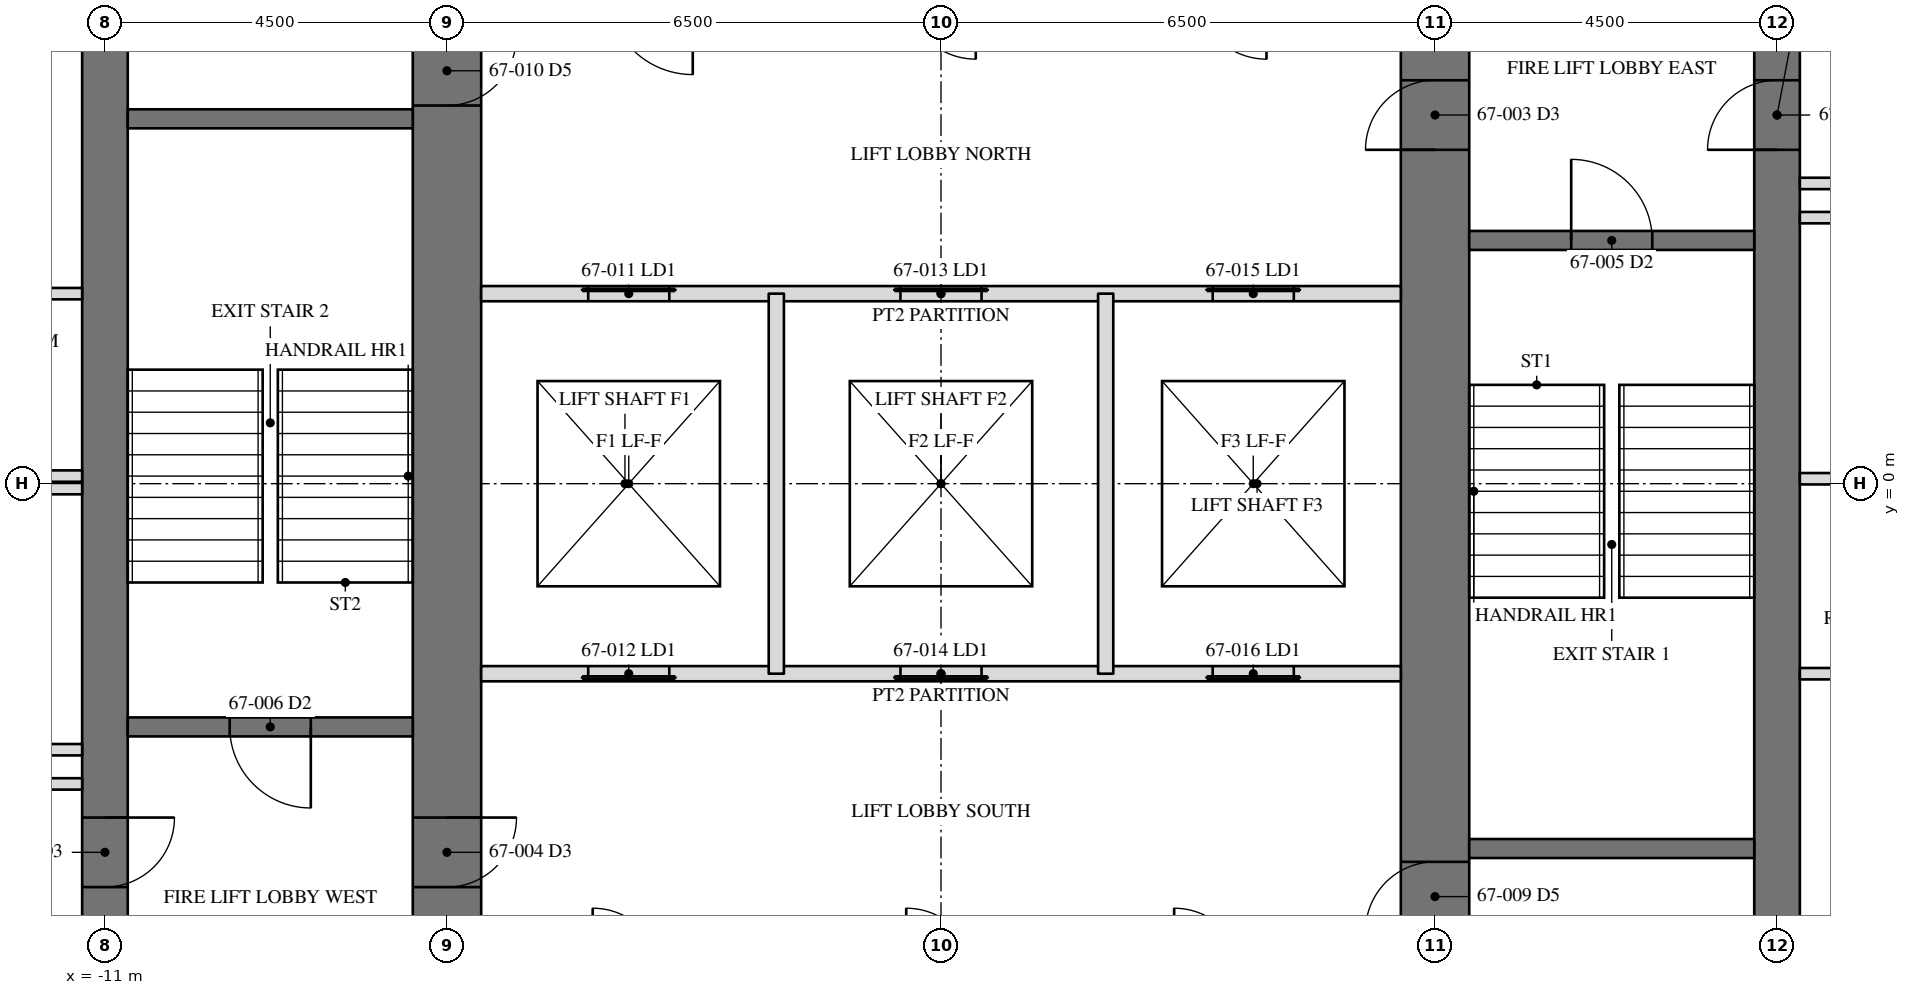
"""IFC4 building model, lengths in metres.
Left out: names, types, materials, properties, quantities, classifications, styles, units other than length and angle.
Written with IfcOpenShell. Run it as: python <this file> out.ifc"""

import sys

from ifc_helpers import new_model, si_unit, direction, frame, frame_2d, origin, place, context, subcontext, project, spatial, rectangle, extrude, element, fill, save


model = new_model("IFC4")
c1 = context("Model", 3, precision=1e-05, world=origin(), true_north=direction((0.0, 1.0)))
c2 = subcontext(c1, "Body", "Model", "MODEL_VIEW")
j1 = project(units=[si_unit("LENGTHUNIT", "METRE"), si_unit("PLANEANGLEUNIT", "RADIAN")], contexts=[c1])
p1 = place(None, origin())
s1 = spatial("IfcSite", under=j1, at=p1, CompositionType="ELEMENT")
p2 = place(p1, origin())
s2 = spatial("IfcBuilding", under=s1, at=p2, CompositionType="ELEMENT")
p3 = place(p2, frame((0.0, 0.0, 274.0)))
s3 = spatial("IfcBuildingStorey", under=s2, at=p3, CompositionType="ELEMENT", Elevation=274.0)
p4 = place(p3, frame((11.0, -11.0, 0.0), z_axis=(0.0, 0.0, 1.0), x_axis=(0.0, 1.0, 0.0)))
e1 = element("IfcWall", 1, at=p4, inside=s3, PredefinedType="SHEAR", context=c2, shape_type="SweptSolid", body=[
    extrude(rectangle(XDim=22.0, YDim=0.6, at=frame_2d((11.0, 0.0))), origin(), (0.0, 0.0, 1.0), 3.6),
])
p5 = place(p4, frame((15.393, 0.0, 0.0)))
e2 = element("IfcOpeningElement", 2, at=p5, cuts=e1, PredefinedType="OPENING", context=c2, shape_type="SweptSolid", body=[
    extrude(rectangle(XDim=0.915, YDim=2.134, at=frame_2d((0.458, 1.067))), frame((0.0, 0.31, 0.0), z_axis=(0.0, -1.0, 0.0), x_axis=(1.0, 0.0, 0.0)), (0.0, 0.0, 1.0), 0.62),
])
p6 = place(p3, frame((-11.0, 11.0, 0.0), z_axis=(0.0, 0.0, 1.0), x_axis=(0.0, -1.0, 0.0)))
e3 = element("IfcWall", 3, at=p6, inside=s3, PredefinedType="SHEAR", context=c2, shape_type="SweptSolid", body=[
    extrude(rectangle(XDim=22.0, YDim=0.6, at=frame_2d((11.0, 0.0))), origin(), (0.0, 0.0, 1.0), 3.6),
])
p7 = place(p6, frame((15.393, 0.0, 0.0)))
e4 = element("IfcOpeningElement", 4, at=p7, cuts=e3, PredefinedType="OPENING", context=c2, shape_type="SweptSolid", body=[
    extrude(rectangle(XDim=0.915, YDim=2.134, at=frame_2d((0.458, 1.067))), frame((0.0, 0.31, 0.0), z_axis=(0.0, -1.0, 0.0), x_axis=(1.0, 0.0, 0.0)), (0.0, 0.0, 1.0), 0.62),
])
p8 = place(p3, frame((6.5, -6.5, 0.0), z_axis=(0.0, 0.0, 1.0), x_axis=(0.0, 1.0, 0.0)))
e5 = element("IfcWall", 5, at=p8, inside=s3, PredefinedType="SHEAR", context=c2, shape_type="SweptSolid", body=[
    extrude(rectangle(XDim=13.0, YDim=0.9, at=frame_2d((6.5, 0.0))), origin(), (0.0, 0.0, 1.0), 3.6),
])
p9 = place(p8, frame((10.893, 0.0, 0.0)))
e6 = element("IfcOpeningElement", 6, at=p9, cuts=e5, PredefinedType="OPENING", context=c2, shape_type="SweptSolid", body=[
    extrude(rectangle(XDim=0.915, YDim=2.134, at=frame_2d((0.458, 1.067))), frame((0.0, 0.46, 0.0), z_axis=(0.0, -1.0, 0.0), x_axis=(1.0, 0.0, 0.0)), (0.0, 0.0, 1.0), 0.92),
])
p10 = place(p8, frame((0.61, 0.0, 0.0)))
e7 = element("IfcOpeningElement", 7, at=p10, cuts=e5, PredefinedType="OPENING", context=c2, shape_type="SweptSolid", body=[
    extrude(rectangle(XDim=0.915, YDim=2.134, at=frame_2d((0.458, 1.067))), frame((0.0, 0.46, 0.0), z_axis=(0.0, -1.0, 0.0), x_axis=(1.0, 0.0, 0.0)), (0.0, 0.0, 1.0), 0.92),
])
p11 = place(p3, frame((-6.5, 6.5, 0.0), z_axis=(0.0, 0.0, 1.0), x_axis=(0.0, -1.0, 0.0)))
e8 = element("IfcWall", 8, at=p11, inside=s3, PredefinedType="SHEAR", context=c2, shape_type="SweptSolid", body=[
    extrude(rectangle(XDim=13.0, YDim=0.9, at=frame_2d((6.5, 0.0))), origin(), (0.0, 0.0, 1.0), 3.6),
])
p12 = place(p11, frame((10.893, 0.0, 0.0)))
e9 = element("IfcOpeningElement", 9, at=p12, cuts=e8, PredefinedType="OPENING", context=c2, shape_type="SweptSolid", body=[
    extrude(rectangle(XDim=0.915, YDim=2.134, at=frame_2d((0.458, 1.067))), frame((0.0, 0.46, 0.0), z_axis=(0.0, -1.0, 0.0), x_axis=(1.0, 0.0, 0.0)), (0.0, 0.0, 1.0), 0.92),
])
p13 = place(p11, frame((0.61, 0.0, 0.0)))
e10 = element("IfcOpeningElement", 10, at=p13, cuts=e8, PredefinedType="OPENING", context=c2, shape_type="SweptSolid", body=[
    extrude(rectangle(XDim=0.915, YDim=2.134, at=frame_2d((0.458, 1.067))), frame((0.0, 0.46, 0.0), z_axis=(0.0, -1.0, 0.0), x_axis=(1.0, 0.0, 0.0)), (0.0, 0.0, 1.0), 0.92),
])
for number, where, z_axis, x_axis in (
    (11, (6.95, -4.8, 0.0), (0.0, 0.0, 1.0), (1.0, 0.0, 0.0)),
    (12, (-6.95, 4.8, 0.0), (0.0, 0.0, 1.0), (-1.0, 0.0, 0.0)),
):
    element("IfcWall", number, at=place(p3, frame(where, z_axis=z_axis, x_axis=x_axis)), inside=s3, PredefinedType="SOLIDWALL", context=c2, shape_type="SweptSolid", body=[
        extrude(rectangle(XDim=3.75, YDim=0.25, at=frame_2d((1.875, 0.0))), origin(), (0.0, 0.0, 1.0), 3.41),
    ])
p14 = place(p3, frame((6.95, 3.2, 0.0), z_axis=(0.0, 0.0, 1.0), x_axis=(1.0, 0.0, 0.0)))
e13 = element("IfcWall", 13, at=p14, inside=s3, PredefinedType="SOLIDWALL", context=c2, shape_type="SweptSolid", body=[
    extrude(rectangle(XDim=3.75, YDim=0.25, at=frame_2d((1.875, 0.0))), origin(), (0.0, 0.0, 1.0), 3.41),
])
p15 = place(p14, frame((1.342, 0.0, 0.0)))
e14 = element("IfcOpeningElement", 14, at=p15, cuts=e13, PredefinedType="OPENING", context=c2, shape_type="SweptSolid", body=[
    extrude(rectangle(XDim=1.067, YDim=2.134, at=frame_2d((0.533, 1.067))), frame((0.0, 0.135, 0.0), z_axis=(0.0, -1.0, 0.0), x_axis=(1.0, 0.0, 0.0)), (0.0, 0.0, 1.0), 0.27),
])
p16 = place(p3, frame((-6.95, -3.2, 0.0), z_axis=(0.0, 0.0, 1.0), x_axis=(-1.0, 0.0, 0.0)))
e15 = element("IfcWall", 15, at=p16, inside=s3, PredefinedType="SOLIDWALL", context=c2, shape_type="SweptSolid", body=[
    extrude(rectangle(XDim=3.75, YDim=0.25, at=frame_2d((1.875, 0.0))), origin(), (0.0, 0.0, 1.0), 3.41),
])
p17 = place(p16, frame((1.342, 0.0, 0.0)))
e16 = element("IfcOpeningElement", 16, at=p17, cuts=e15, PredefinedType="OPENING", context=c2, shape_type="SweptSolid", body=[
    extrude(rectangle(XDim=1.067, YDim=2.134, at=frame_2d((0.533, 1.067))), frame((0.0, 0.135, 0.0), z_axis=(0.0, -1.0, 0.0), x_axis=(1.0, 0.0, 0.0)), (0.0, 0.0, 1.0), 0.27),
])
p18 = place(p3, frame((-6.05, 2.5, 0.0), z_axis=(0.0, 0.0, 1.0), x_axis=(1.0, 0.0, 0.0)))
e17 = element("IfcWall", 17, at=p18, inside=s3, PredefinedType="PARTITIONING", context=c2, shape_type="SweptSolid", body=[
    extrude(rectangle(XDim=12.1, YDim=0.2, at=frame_2d((6.05, 0.0))), origin(), (0.0, 0.0, 1.0), 3.41),
])
p19 = place(p18, frame((1.408, 0.0, 0.0)))
e18 = element("IfcOpeningElement", 18, at=p19, cuts=e17, PredefinedType="OPENING", context=c2, shape_type="SweptSolid", body=[
    extrude(rectangle(XDim=1.067, YDim=2.134, at=frame_2d((0.533, 1.067))), frame((0.0, 0.11, 0.0), z_axis=(0.0, -1.0, 0.0), x_axis=(1.0, 0.0, 0.0)), (0.0, 0.0, 1.0), 0.22),
])
p20 = place(p18, frame((5.517, 0.0, 0.0)))
e19 = element("IfcOpeningElement", 19, at=p20, cuts=e17, PredefinedType="OPENING", context=c2, shape_type="SweptSolid", body=[
    extrude(rectangle(XDim=1.067, YDim=2.134, at=frame_2d((0.533, 1.067))), frame((0.0, 0.11, 0.0), z_axis=(0.0, -1.0, 0.0), x_axis=(1.0, 0.0, 0.0)), (0.0, 0.0, 1.0), 0.22),
])
p21 = place(p18, frame((9.625, 0.0, 0.0)))
e20 = element("IfcOpeningElement", 20, at=p21, cuts=e17, PredefinedType="OPENING", context=c2, shape_type="SweptSolid", body=[
    extrude(rectangle(XDim=1.067, YDim=2.134, at=frame_2d((0.533, 1.067))), frame((0.0, 0.11, 0.0), z_axis=(0.0, -1.0, 0.0), x_axis=(1.0, 0.0, 0.0)), (0.0, 0.0, 1.0), 0.22),
])
p22 = place(p3, frame((6.05, -2.5, 0.0), z_axis=(0.0, 0.0, 1.0), x_axis=(-1.0, 0.0, 0.0)))
e21 = element("IfcWall", 21, at=p22, inside=s3, PredefinedType="PARTITIONING", context=c2, shape_type="SweptSolid", body=[
    extrude(rectangle(XDim=12.1, YDim=0.2, at=frame_2d((6.05, 0.0))), origin(), (0.0, 0.0, 1.0), 3.41),
])
p23 = place(p22, frame((9.625, 0.0, 0.0)))
e22 = element("IfcOpeningElement", 22, at=p23, cuts=e21, PredefinedType="OPENING", context=c2, shape_type="SweptSolid", body=[
    extrude(rectangle(XDim=1.067, YDim=2.134, at=frame_2d((0.533, 1.067))), frame((0.0, 0.11, 0.0), z_axis=(0.0, -1.0, 0.0), x_axis=(1.0, 0.0, 0.0)), (0.0, 0.0, 1.0), 0.22),
])
p24 = place(p22, frame((5.517, 0.0, 0.0)))
e23 = element("IfcOpeningElement", 23, at=p24, cuts=e21, PredefinedType="OPENING", context=c2, shape_type="SweptSolid", body=[
    extrude(rectangle(XDim=1.067, YDim=2.134, at=frame_2d((0.533, 1.067))), frame((0.0, 0.11, 0.0), z_axis=(0.0, -1.0, 0.0), x_axis=(1.0, 0.0, 0.0)), (0.0, 0.0, 1.0), 0.22),
])
p25 = place(p22, frame((1.408, 0.0, 0.0)))
e24 = element("IfcOpeningElement", 24, at=p25, cuts=e21, PredefinedType="OPENING", context=c2, shape_type="SweptSolid", body=[
    extrude(rectangle(XDim=1.067, YDim=2.134, at=frame_2d((0.533, 1.067))), frame((0.0, 0.11, 0.0), z_axis=(0.0, -1.0, 0.0), x_axis=(1.0, 0.0, 0.0)), (0.0, 0.0, 1.0), 0.22),
])
for number, where, z_axis, x_axis in (
    (25, (-2.167, -2.5, 0.0), (0.0, 0.0, 1.0), (0.0, 1.0, 0.0)),
    (26, (2.167, -2.5, 0.0), (0.0, 0.0, 1.0), (0.0, 1.0, 0.0)),
):
    element("IfcWall", number, at=place(p3, frame(where, z_axis=z_axis, x_axis=x_axis)), inside=s3, PredefinedType="PARTITIONING", context=c2, shape_type="SweptSolid", body=[
        extrude(rectangle(XDim=5.0, YDim=0.2, at=frame_2d((2.5, 0.0))), origin(), (0.0, 0.0, 1.0), 3.41),
    ])
p26 = place(p3, frame((11.3, 0.065, 0.0), z_axis=(0.0, 0.0, 1.0), x_axis=(1.0, 0.0, 0.0)))
e27 = element("IfcWall", 27, at=p26, inside=s3, PredefinedType="PARTITIONING", context=c2, shape_type="SweptSolid", body=[
    extrude(rectangle(XDim=5.615, YDim=0.15, at=frame_2d((2.808, 0.0))), origin(), (0.0, 0.0, 1.0), 2.709),
])
p27 = place(p26, frame((3.242, 0.0, 0.0)))
e28 = element("IfcOpeningElement", 28, at=p27, cuts=e27, PredefinedType="OPENING", context=c2, shape_type="SweptSolid", body=[
    extrude(rectangle(XDim=0.915, YDim=2.134, at=frame_2d((0.458, 1.067))), frame((0.0, 0.085, 0.0), z_axis=(0.0, -1.0, 0.0), x_axis=(1.0, 0.0, 0.0)), (0.0, 0.0, 1.0), 0.17),
])
p28 = place(p3, frame((11.3, 3.95, 0.0), z_axis=(0.0, 0.0, 1.0), x_axis=(1.0, 0.0, 0.0)))
e29 = element("IfcWall", 29, at=p28, inside=s3, PredefinedType="PARTITIONING", context=c2, shape_type="SweptSolid", body=[
    extrude(rectangle(XDim=1.525, YDim=0.15, at=frame_2d((0.762, 0.0))), origin(), (0.0, 0.0, 1.0), 3.41),
])
p29 = place(p3, frame((11.3, 3.5, 0.0), z_axis=(0.0, 0.0, 1.0), x_axis=(1.0, 0.0, 0.0)))
e30 = element("IfcWall", 30, at=p29, inside=s3, PredefinedType="PARTITIONING", context=c2, shape_type="SweptSolid", body=[
    extrude(rectangle(XDim=2.725, YDim=0.15, at=frame_2d((1.362, 0.0))), origin(), (0.0, 0.0, 1.0), 3.41),
])
p30 = place(p3, frame((11.3, -2.5, 0.0), z_axis=(0.0, 0.0, 1.0), x_axis=(1.0, 0.0, 0.0)))
e31 = element("IfcWall", 31, at=p30, inside=s3, PredefinedType="PARTITIONING", context=c2, shape_type="SweptSolid", body=[
    extrude(rectangle(XDim=2.375, YDim=0.15, at=frame_2d((1.188, 0.0))), origin(), (0.0, 0.0, 1.0), 3.41),
])
p31 = place(p3, frame((-11.3, -3.95, 0.0), z_axis=(0.0, 0.0, 1.0), x_axis=(-1.0, 0.0, 0.0)))
e32 = element("IfcWall", 32, at=p31, inside=s3, PredefinedType="PARTITIONING", context=c2, shape_type="SweptSolid", body=[
    extrude(rectangle(XDim=1.525, YDim=0.15, at=frame_2d((0.762, 0.0))), origin(), (0.0, 0.0, 1.0), 3.41),
])
p32 = place(p3, frame((-11.3, -0.065, 0.0), z_axis=(0.0, 0.0, 1.0), x_axis=(-1.0, 0.0, 0.0)))
e33 = element("IfcWall", 33, at=p32, inside=s3, PredefinedType="PARTITIONING", context=c2, shape_type="SweptSolid", body=[
    extrude(rectangle(XDim=2.725, YDim=0.15, at=frame_2d((1.362, 0.0))), origin(), (0.0, 0.0, 1.0), 2.709),
])
p33 = place(p3, frame((-11.3, -3.5, 0.0), z_axis=(0.0, 0.0, 1.0), x_axis=(-1.0, 0.0, 0.0)))
e34 = element("IfcWall", 34, at=p33, inside=s3, PredefinedType="PARTITIONING", context=c2, shape_type="SweptSolid", body=[
    extrude(rectangle(XDim=2.725, YDim=0.15, at=frame_2d((1.362, 0.0))), origin(), (0.0, 0.0, 1.0), 3.41),
])
p34 = place(p3, frame((-11.3, 2.5, 0.0), z_axis=(0.0, 0.0, 1.0), x_axis=(-1.0, 0.0, 0.0)))
e35 = element("IfcWall", 35, at=p34, inside=s3, PredefinedType="PARTITIONING", context=c2, shape_type="SweptSolid", body=[
    extrude(rectangle(XDim=2.375, YDim=0.15, at=frame_2d((1.188, 0.0))), origin(), (0.0, 0.0, 1.0), 3.41),
])
p35 = place(p3, frame((-11.3, 0.1, 0.0), z_axis=(0.0, 0.0, 1.0), x_axis=(-1.0, 0.0, 0.0)))
e36 = element("IfcWall", 36, at=p35, inside=s3, PredefinedType="PARTITIONING", context=c2, shape_type="SweptSolid", body=[
    extrude(rectangle(XDim=2.375, YDim=0.15, at=frame_2d((1.188, 0.0))), origin(), (0.0, 0.0, 1.0), 2.709),
])
p36 = place(p5, origin())
e37 = element("IfcDoor", 37, at=p36, inside=s3, OperationType="SINGLE_SWING_RIGHT", PredefinedType="DOOR", context=c2, shape_type="SweptSolid", body=[
    extrude(rectangle(XDim=0.915, YDim=2.134, at=frame_2d((0.458, 1.067))), frame((0.0, -0.225, 0.0), z_axis=(0.0, -1.0, 0.0), x_axis=(1.0, 0.0, 0.0)), (0.0, 0.0, 1.0), 0.05),
])
fill(e2, e37)
p37 = place(p7, origin())
e38 = element("IfcDoor", 38, at=p37, inside=s3, OperationType="SINGLE_SWING_RIGHT", PredefinedType="DOOR", context=c2, shape_type="SweptSolid", body=[
    extrude(rectangle(XDim=0.915, YDim=2.134, at=frame_2d((0.458, 1.067))), frame((0.0, -0.225, 0.0), z_axis=(0.0, -1.0, 0.0), x_axis=(1.0, 0.0, 0.0)), (0.0, 0.0, 1.0), 0.05),
])
fill(e4, e38)
p38 = place(p9, origin())
e39 = element("IfcDoor", 39, at=p38, inside=s3, OperationType="SINGLE_SWING_RIGHT", PredefinedType="DOOR", context=c2, shape_type="SweptSolid", body=[
    extrude(rectangle(XDim=0.915, YDim=2.134, at=frame_2d((0.458, 1.067))), frame((0.0, -0.375, 0.0), z_axis=(0.0, -1.0, 0.0), x_axis=(1.0, 0.0, 0.0)), (0.0, 0.0, 1.0), 0.05),
])
fill(e6, e39)
p39 = place(p12, origin())
e40 = element("IfcDoor", 40, at=p39, inside=s3, OperationType="SINGLE_SWING_RIGHT", PredefinedType="DOOR", context=c2, shape_type="SweptSolid", body=[
    extrude(rectangle(XDim=0.915, YDim=2.134, at=frame_2d((0.458, 1.067))), frame((0.0, -0.375, 0.0), z_axis=(0.0, -1.0, 0.0), x_axis=(1.0, 0.0, 0.0)), (0.0, 0.0, 1.0), 0.05),
])
fill(e9, e40)
p40 = place(p15, origin())
e41 = element("IfcDoor", 41, at=p40, inside=s3, OperationType="SINGLE_SWING_LEFT", PredefinedType="DOOR", context=c2, shape_type="SweptSolid", body=[
    extrude(rectangle(XDim=1.067, YDim=2.134, at=frame_2d((0.533, 1.067))), frame((0.0, 0.025, 0.0), z_axis=(0.0, -1.0, 0.0), x_axis=(1.0, 0.0, 0.0)), (0.0, 0.0, 1.0), 0.05),
])
fill(e14, e41)
p41 = place(p17, origin())
e42 = element("IfcDoor", 42, at=p41, inside=s3, OperationType="SINGLE_SWING_LEFT", PredefinedType="DOOR", context=c2, shape_type="SweptSolid", body=[
    extrude(rectangle(XDim=1.067, YDim=2.134, at=frame_2d((0.533, 1.067))), frame((0.0, 0.025, 0.0), z_axis=(0.0, -1.0, 0.0), x_axis=(1.0, 0.0, 0.0)), (0.0, 0.0, 1.0), 0.05),
])
fill(e16, e42)
p42 = place(p10, origin())
e43 = element("IfcDoor", 43, at=p42, inside=s3, OperationType="SINGLE_SWING_RIGHT", PredefinedType="DOOR", context=c2, shape_type="SweptSolid", body=[
    extrude(rectangle(XDim=0.915, YDim=2.134, at=frame_2d((0.458, 1.067))), frame((0.0, -0.375, 0.0), z_axis=(0.0, -1.0, 0.0), x_axis=(1.0, 0.0, 0.0)), (0.0, 0.0, 1.0), 0.05),
])
fill(e7, e43)
p43 = place(p13, origin())
e44 = element("IfcDoor", 44, at=p43, inside=s3, OperationType="SINGLE_SWING_RIGHT", PredefinedType="DOOR", context=c2, shape_type="SweptSolid", body=[
    extrude(rectangle(XDim=0.915, YDim=2.134, at=frame_2d((0.458, 1.067))), frame((0.0, -0.375, 0.0), z_axis=(0.0, -1.0, 0.0), x_axis=(1.0, 0.0, 0.0)), (0.0, 0.0, 1.0), 0.05),
])
fill(e10, e44)
p44 = place(p19, origin())
e45 = element("IfcDoor", 45, at=p44, inside=s3, OperationType="SLIDING_TO_LEFT", PredefinedType="DOOR", context=c2, shape_type="SweptSolid", body=[
    extrude(rectangle(XDim=1.067, YDim=2.134, at=frame_2d((0.533, 1.067))), frame((0.0, 0.025, 0.0), z_axis=(0.0, -1.0, 0.0), x_axis=(1.0, 0.0, 0.0)), (0.0, 0.0, 1.0), 0.05),
])
fill(e18, e45)
p45 = place(p23, origin())
e46 = element("IfcDoor", 46, at=p45, inside=s3, OperationType="SLIDING_TO_LEFT", PredefinedType="DOOR", context=c2, shape_type="SweptSolid", body=[
    extrude(rectangle(XDim=1.067, YDim=2.134, at=frame_2d((0.533, 1.067))), frame((0.0, 0.025, 0.0), z_axis=(0.0, -1.0, 0.0), x_axis=(1.0, 0.0, 0.0)), (0.0, 0.0, 1.0), 0.05),
])
fill(e22, e46)
p46 = place(p20, origin())
e47 = element("IfcDoor", 47, at=p46, inside=s3, OperationType="SLIDING_TO_LEFT", PredefinedType="DOOR", context=c2, shape_type="SweptSolid", body=[
    extrude(rectangle(XDim=1.067, YDim=2.134, at=frame_2d((0.533, 1.067))), frame((0.0, 0.025, 0.0), z_axis=(0.0, -1.0, 0.0), x_axis=(1.0, 0.0, 0.0)), (0.0, 0.0, 1.0), 0.05),
])
fill(e19, e47)
p47 = place(p24, origin())
e48 = element("IfcDoor", 48, at=p47, inside=s3, OperationType="SLIDING_TO_LEFT", PredefinedType="DOOR", context=c2, shape_type="SweptSolid", body=[
    extrude(rectangle(XDim=1.067, YDim=2.134, at=frame_2d((0.533, 1.067))), frame((0.0, 0.025, 0.0), z_axis=(0.0, -1.0, 0.0), x_axis=(1.0, 0.0, 0.0)), (0.0, 0.0, 1.0), 0.05),
])
fill(e23, e48)
p48 = place(p21, origin())
e49 = element("IfcDoor", 49, at=p48, inside=s3, OperationType="SLIDING_TO_LEFT", PredefinedType="DOOR", context=c2, shape_type="SweptSolid", body=[
    extrude(rectangle(XDim=1.067, YDim=2.134, at=frame_2d((0.533, 1.067))), frame((0.0, 0.025, 0.0), z_axis=(0.0, -1.0, 0.0), x_axis=(1.0, 0.0, 0.0)), (0.0, 0.0, 1.0), 0.05),
])
fill(e20, e49)
p49 = place(p25, origin())
e50 = element("IfcDoor", 50, at=p49, inside=s3, OperationType="SLIDING_TO_LEFT", PredefinedType="DOOR", context=c2, shape_type="SweptSolid", body=[
    extrude(rectangle(XDim=1.067, YDim=2.134, at=frame_2d((0.533, 1.067))), frame((0.0, 0.025, 0.0), z_axis=(0.0, -1.0, 0.0), x_axis=(1.0, 0.0, 0.0)), (0.0, 0.0, 1.0), 0.05),
])
fill(e24, e50)
save(model, sys.argv[1])
